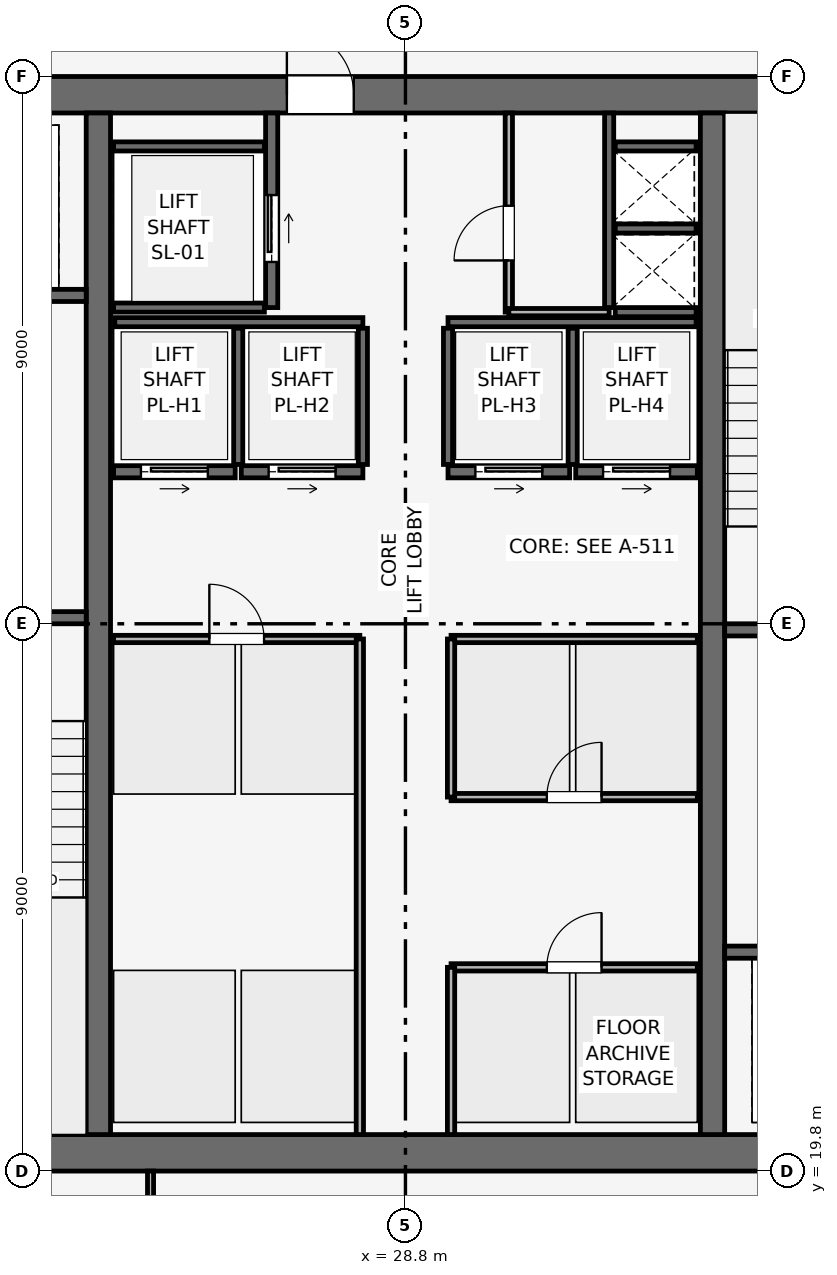
"""IFC4 building model, lengths in metres.
Left out: names, types, materials, properties, quantities, classifications, styles, units other than length and angle.
Written with IfcOpenShell. Run it as: python <this file> out.ifc"""

import sys

from ifc_helpers import new_model, si_unit, direction, frame, frame_2d, origin, place, context, subcontext, project, spatial, rectangle, extrude, element, fill, save


model = new_model("IFC4")
c1 = context("Model", 3, precision=1e-05, world=origin(), true_north=direction((0.0, 1.0)))
c2 = subcontext(c1, "Body", "Model", "MODEL_VIEW")
j1 = project(units=[si_unit("LENGTHUNIT", "METRE"), si_unit("PLANEANGLEUNIT", "RADIAN")], contexts=[c1])
p1 = place(None, origin())
s1 = spatial("IfcSite", under=j1, at=p1, CompositionType="ELEMENT")
p2 = place(p1, origin())
s2 = spatial("IfcBuilding", under=s1, at=p2, CompositionType="ELEMENT")
p3 = place(p2, frame((0.0, 0.0, 314.25)))
s3 = spatial("IfcBuildingStorey", under=s2, at=p3, CompositionType="ELEMENT", Elevation=314.25)
p4 = place(p3, frame((19.8, 20.1, 0.0), z_axis=(0.0, 0.0, 1.0), x_axis=(1.0, 0.0, 0.0)))
e1 = element("IfcWall", 1, at=p4, inside=s3, PredefinedType="SHEAR", context=c2, shape_type="SweptSolid", body=[
    extrude(rectangle(XDim=18.0, YDim=0.6, at=frame_2d((9.0, 0.0))), origin(), (0.0, 0.0, 1.0), 3.75),
])
p5 = place(p3, frame((19.8, 37.5, 0.0), z_axis=(0.0, 0.0, 1.0), x_axis=(1.0, 0.0, 0.0)))
e2 = element("IfcWall", 2, at=p5, inside=s3, PredefinedType="SHEAR", context=c2, shape_type="SweptSolid", body=[
    extrude(rectangle(XDim=18.0, YDim=0.6, at=frame_2d((9.0, 0.0))), origin(), (0.0, 0.0, 1.0), 3.75),
])
p6 = place(p5, frame((7.05, 0.0, 0.0)))
e3 = element("IfcOpeningElement", 3, at=p6, cuts=e2, PredefinedType="OPENING", context=c2, shape_type="SweptSolid", body=[
    extrude(rectangle(XDim=1.1, YDim=2.15, at=frame_2d((0.55, 1.075))), frame((0.0, 0.31, 0.0), z_axis=(0.0, -1.0, 0.0), x_axis=(1.0, 0.0, 0.0)), (0.0, 0.0, 1.0), 0.62),
])
for number, where, z_axis, x_axis in (
    (4, (23.75, 20.4, 0.0), (0.0, 0.0, 1.0), (0.0, 1.0, 0.0)),
    (5, (33.85, 20.4, 0.0), (0.0, 0.0, 1.0), (0.0, 1.0, 0.0)),
):
    element("IfcWall", number, at=place(p3, frame(where, z_axis=z_axis, x_axis=x_axis)), inside=s3, PredefinedType="SHEAR", context=c2, shape_type="SweptSolid", body=[
        extrude(rectangle(XDim=16.8, YDim=0.4, at=frame_2d((8.4, 0.0))), origin(), (0.0, 0.0, 1.0), 3.75),
    ])
p7 = place(p3, frame((20.4, 28.9, 0.0), z_axis=(0.0, 0.0, 1.0), x_axis=(1.0, 0.0, 0.0)))
e6 = element("IfcWall", 6, at=p7, inside=s3, PredefinedType="SHEAR", context=c2, shape_type="SweptSolid", body=[
    extrude(rectangle(XDim=3.15, YDim=0.2, at=frame_2d((1.575, 0.0))), origin(), (0.0, 0.0, 1.0), 3.51),
])
p8 = place(p7, frame((0.8, 0.0, 0.0)))
e7 = element("IfcOpeningElement", 7, at=p8, cuts=e6, PredefinedType="OPENING", context=c2, shape_type="SweptSolid", body=[
    extrude(rectangle(XDim=1.0, YDim=2.1, at=frame_2d((0.5, 1.05))), frame((0.0, 0.11, 0.0), z_axis=(0.0, -1.0, 0.0), x_axis=(1.0, 0.0, 0.0)), (0.0, 0.0, 1.0), 0.22),
])
p9 = place(p3, frame((34.05, 28.7, 0.0), z_axis=(0.0, 0.0, 1.0), x_axis=(1.0, 0.0, 0.0)))
e8 = element("IfcWall", 8, at=p9, inside=s3, PredefinedType="SHEAR", context=c2, shape_type="SweptSolid", body=[
    extrude(rectangle(XDim=3.15, YDim=0.2, at=frame_2d((1.575, 0.0))), origin(), (0.0, 0.0, 1.0), 3.51),
])
p10 = place(p9, frame((0.8, 0.0, 0.0)))
e9 = element("IfcOpeningElement", 9, at=p10, cuts=e8, PredefinedType="OPENING", context=c2, shape_type="SweptSolid", body=[
    extrude(rectangle(XDim=1.0, YDim=2.1, at=frame_2d((0.5, 1.05))), frame((0.0, 0.11, 0.0), z_axis=(0.0, -1.0, 0.0), x_axis=(1.0, 0.0, 0.0)), (0.0, 0.0, 1.0), 0.22),
])
p11 = place(p3, frame((32.15, 34.0, 0.0), z_axis=(0.0, 0.0, 1.0), x_axis=(0.0, 1.0, 0.0)))
e10 = element("IfcWall", 10, at=p11, inside=s3, PredefinedType="SHEAR", context=c2, shape_type="SweptSolid", body=[
    extrude(rectangle(XDim=3.2, YDim=0.15, at=frame_2d((1.6, 0.0))), origin(), (0.0, 0.0, 1.0), 3.51),
])
for number, where, z_axis, x_axis in (
    (11, (32.25, 33.925, 0.0), (0.0, 0.0, 1.0), (1.0, 0.0, 0.0)),
    (12, (32.25, 35.3, 0.0), (0.0, 0.0, 1.0), (1.0, 0.0, 0.0)),
):
    element("IfcWall", number, at=place(p3, frame(where, z_axis=z_axis, x_axis=x_axis)), inside=s3, PredefinedType="SHEAR", context=c2, shape_type="SweptSolid", body=[
        extrude(rectangle(XDim=1.33, YDim=0.15, at=frame_2d((0.665, 0.0))), origin(), (0.0, 0.0, 1.0), 3.51),
    ])
p12 = place(p3, frame((20.5, 34.2, 0.0), z_axis=(0.0, 0.0, 1.0), x_axis=(1.0, 0.0, 0.0)))
e13 = element("IfcWall", 13, at=p12, inside=s3, PredefinedType="SHEAR", context=c2, shape_type="SweptSolid", body=[
    extrude(rectangle(XDim=3.05, YDim=0.2, at=frame_2d((1.525, 0.0))), origin(), (0.0, 0.0, 1.0), 3.51),
])
p13 = place(p12, frame((0.75, 0.0, 0.0)))
e14 = element("IfcOpeningElement", 14, at=p13, cuts=e13, PredefinedType="OPENING", context=c2, shape_type="SweptSolid", body=[
    extrude(rectangle(XDim=1.1, YDim=2.15, at=frame_2d((0.55, 1.075))), frame((0.0, 0.11, 0.0), z_axis=(0.0, -1.0, 0.0), x_axis=(1.0, 0.0, 0.0)), (0.0, 0.0, 1.0), 0.22),
])
p14 = place(p3, frame((34.05, 23.4, 0.0), z_axis=(0.0, 0.0, 1.0), x_axis=(1.0, 0.0, 0.0)))
e15 = element("IfcWall", 15, at=p14, inside=s3, PredefinedType="SHEAR", context=c2, shape_type="SweptSolid", body=[
    extrude(rectangle(XDim=3.05, YDim=0.2, at=frame_2d((1.525, 0.0))), origin(), (0.0, 0.0, 1.0), 3.51),
])
p15 = place(p14, frame((1.2, 0.0, 0.0)))
e16 = element("IfcOpeningElement", 16, at=p15, cuts=e15, PredefinedType="OPENING", context=c2, shape_type="SweptSolid", body=[
    extrude(rectangle(XDim=1.1, YDim=2.15, at=frame_2d((0.55, 1.075))), frame((0.0, 0.11, 0.0), z_axis=(0.0, -1.0, 0.0), x_axis=(1.0, 0.0, 0.0)), (0.0, 0.0, 1.0), 0.22),
])
p16 = place(p3, frame((26.6, 34.0, 0.0), z_axis=(0.0, 0.0, 1.0), x_axis=(0.0, 1.0, 0.0)))
e17 = element("IfcWall", 17, at=p16, inside=s3, PredefinedType="SHEAR", context=c2, shape_type="SweptSolid", body=[
    extrude(rectangle(XDim=3.2, YDim=0.2, at=frame_2d((1.6, 0.0))), origin(), (0.0, 0.0, 1.0), 3.51),
])
p17 = place(p16, frame((0.75, 0.0, 0.0)))
e18 = element("IfcOpeningElement", 18, at=p17, cuts=e17, PredefinedType="OPENING", context=c2, shape_type="SweptSolid", body=[
    extrude(rectangle(XDim=1.1, YDim=2.15, at=frame_2d((0.55, 1.075))), frame((0.0, 0.11, 0.0), z_axis=(0.0, -1.0, 0.0), x_axis=(1.0, 0.0, 0.0)), (0.0, 0.0, 1.0), 0.22),
])
for number, where, z_axis, x_axis in (
    (19, (24.0, 34.0, 0.0), (0.0, 0.0, 1.0), (1.0, 0.0, 0.0)),
    (20, (24.0, 36.65, 0.0), (0.0, 0.0, 1.0), (1.0, 0.0, 0.0)),
):
    element("IfcWall", number, at=place(p3, frame(where, z_axis=z_axis, x_axis=x_axis)), inside=s3, PredefinedType="SHEAR", context=c2, shape_type="SweptSolid", body=[
        extrude(rectangle(XDim=2.48, YDim=0.15, at=frame_2d((1.24, 0.0))), origin(), (0.0, 0.0, 1.0), 3.51),
    ])
p18 = place(p3, frame((24.0, 31.3, 0.0), z_axis=(0.0, 0.0, 1.0), x_axis=(1.0, 0.0, 0.0)))
e21 = element("IfcWall", 21, at=p18, inside=s3, PredefinedType="SHEAR", context=c2, shape_type="SweptSolid", body=[
    extrude(rectangle(XDim=2.0, YDim=0.2, at=frame_2d((1.0, 0.0))), origin(), (0.0, 0.0, 1.0), 3.51),
])
p19 = place(p18, frame((0.45, 0.0, 0.0)))
e22 = element("IfcOpeningElement", 22, at=p19, cuts=e21, PredefinedType="OPENING", context=c2, shape_type="SweptSolid", body=[
    extrude(rectangle(XDim=1.1, YDim=2.15, at=frame_2d((0.55, 1.075))), frame((0.0, 0.11, 0.0), z_axis=(0.0, -1.0, 0.0), x_axis=(1.0, 0.0, 0.0)), (0.0, 0.0, 1.0), 0.22),
])
p20 = place(p3, frame((26.1, 31.3, 0.0), z_axis=(0.0, 0.0, 1.0), x_axis=(1.0, 0.0, 0.0)))
e23 = element("IfcWall", 23, at=p20, inside=s3, PredefinedType="SHEAR", context=c2, shape_type="SweptSolid", body=[
    extrude(rectangle(XDim=2.0, YDim=0.2, at=frame_2d((1.0, 0.0))), origin(), (0.0, 0.0, 1.0), 3.51),
])
p21 = place(p20, frame((0.45, 0.0, 0.0)))
e24 = element("IfcOpeningElement", 24, at=p21, cuts=e23, PredefinedType="OPENING", context=c2, shape_type="SweptSolid", body=[
    extrude(rectangle(XDim=1.1, YDim=2.15, at=frame_2d((0.55, 1.075))), frame((0.0, 0.11, 0.0), z_axis=(0.0, -1.0, 0.0), x_axis=(1.0, 0.0, 0.0)), (0.0, 0.0, 1.0), 0.22),
])
p22 = place(p3, frame((29.5, 31.3, 0.0), z_axis=(0.0, 0.0, 1.0), x_axis=(1.0, 0.0, 0.0)))
e25 = element("IfcWall", 25, at=p22, inside=s3, PredefinedType="SHEAR", context=c2, shape_type="SweptSolid", body=[
    extrude(rectangle(XDim=2.0, YDim=0.2, at=frame_2d((1.0, 0.0))), origin(), (0.0, 0.0, 1.0), 3.51),
])
p23 = place(p22, frame((0.45, 0.0, 0.0)))
e26 = element("IfcOpeningElement", 26, at=p23, cuts=e25, PredefinedType="OPENING", context=c2, shape_type="SweptSolid", body=[
    extrude(rectangle(XDim=1.1, YDim=2.15, at=frame_2d((0.55, 1.075))), frame((0.0, 0.11, 0.0), z_axis=(0.0, -1.0, 0.0), x_axis=(1.0, 0.0, 0.0)), (0.0, 0.0, 1.0), 0.22),
])
p24 = place(p3, frame((31.6, 31.3, 0.0), z_axis=(0.0, 0.0, 1.0), x_axis=(1.0, 0.0, 0.0)))
e27 = element("IfcWall", 27, at=p24, inside=s3, PredefinedType="SHEAR", context=c2, shape_type="SweptSolid", body=[
    extrude(rectangle(XDim=2.0, YDim=0.2, at=frame_2d((1.0, 0.0))), origin(), (0.0, 0.0, 1.0), 3.51),
])
p25 = place(p24, frame((0.45, 0.0, 0.0)))
e28 = element("IfcOpeningElement", 28, at=p25, cuts=e27, PredefinedType="OPENING", context=c2, shape_type="SweptSolid", body=[
    extrude(rectangle(XDim=1.1, YDim=2.15, at=frame_2d((0.55, 1.075))), frame((0.0, 0.11, 0.0), z_axis=(0.0, -1.0, 0.0), x_axis=(1.0, 0.0, 0.0)), (0.0, 0.0, 1.0), 0.22),
])
p26 = place(p3, frame((32.25, 36.65, 0.0), z_axis=(0.0, 0.0, 1.0), x_axis=(1.0, 0.0, 0.0)))
e29 = element("IfcWall", 29, at=p26, inside=s3, PredefinedType="SHEAR", context=c2, shape_type="SweptSolid", body=[
    extrude(rectangle(XDim=1.33, YDim=0.15, at=frame_2d((0.665, 0.0))), origin(), (0.0, 0.0, 1.0), 3.51),
])
for number, where, z_axis, x_axis in (
    (30, (24.02, 33.76, 0.0), (0.0, 0.0, 1.0), (1.0, 0.0, 0.0)),
    (31, (29.5, 33.76, 0.0), (0.0, 0.0, 1.0), (1.0, 0.0, 0.0)),
):
    element("IfcWall", number, at=place(p3, frame(where, z_axis=z_axis, x_axis=x_axis)), inside=s3, PredefinedType="SHEAR", context=c2, shape_type="SweptSolid", body=[
        extrude(rectangle(XDim=4.08, YDim=0.15, at=frame_2d((2.04, 0.0))), origin(), (0.0, 0.0, 1.0), 3.51),
    ])
for number, where, z_axis, x_axis in (
    (32, (26.05, 31.42, 0.0), (0.0, 0.0, 1.0), (0.0, 1.0, 0.0)),
    (33, (28.1, 31.42, 0.0), (0.0, 0.0, 1.0), (0.0, 1.0, 0.0)),
    (34, (29.5, 31.42, 0.0), (0.0, 0.0, 1.0), (0.0, 1.0, 0.0)),
    (35, (31.55, 31.42, 0.0), (0.0, 0.0, 1.0), (0.0, 1.0, 0.0)),
):
    element("IfcWall", number, at=place(p3, frame(where, z_axis=z_axis, x_axis=x_axis)), inside=s3, PredefinedType="SHEAR", context=c2, shape_type="SweptSolid", body=[
        extrude(rectangle(XDim=2.24, YDim=0.15, at=frame_2d((1.12, 0.0))), origin(), (0.0, 0.0, 1.0), 3.51),
    ])
p27 = place(p3, frame((30.5, 33.925, 0.0), z_axis=(0.0, 0.0, 1.0), x_axis=(0.0, 1.0, 0.0)))
e36 = element("IfcWall", 36, at=p27, inside=s3, PredefinedType="PARTITIONING", context=c2, shape_type="SweptSolid", body=[
    extrude(rectangle(XDim=3.275, YDim=0.12, at=frame_2d((1.637, 0.0))), origin(), (0.0, 0.0, 1.0), 3.51),
])
p28 = place(p27, frame((0.85, 0.0, 0.0)))
e37 = element("IfcOpeningElement", 37, at=p28, cuts=e36, PredefinedType="OPENING", context=c2, shape_type="SweptSolid", body=[
    extrude(rectangle(XDim=0.9, YDim=2.1, at=frame_2d((0.45, 1.05))), frame((0.0, 0.07, 0.0), z_axis=(0.0, -1.0, 0.0), x_axis=(1.0, 0.0, 0.0)), (0.0, 0.0, 1.0), 0.14),
])
p29 = place(p3, frame((30.5, 33.925, 0.0), z_axis=(0.0, 0.0, 1.0), x_axis=(1.0, 0.0, 0.0)))
e38 = element("IfcWall", 38, at=p29, inside=s3, PredefinedType="PARTITIONING", context=c2, shape_type="SweptSolid", body=[
    extrude(rectangle(XDim=1.65, YDim=0.12, at=frame_2d((0.825, 0.0))), origin(), (0.0, 0.0, 1.0), 3.51),
])
p30 = place(p3, frame((24.0, 28.55, 0.0), z_axis=(0.0, 0.0, 1.0), x_axis=(1.0, 0.0, 0.0)))
e39 = element("IfcWall", 39, at=p30, inside=s3, PredefinedType="PARTITIONING", context=c2, shape_type="SweptSolid", body=[
    extrude(rectangle(XDim=4.05, YDim=0.12, at=frame_2d((2.025, 0.0))), origin(), (0.0, 0.0, 1.0), 3.51),
])
p31 = place(p30, frame((1.575, 0.0, 0.0)))
e40 = element("IfcOpeningElement", 40, at=p31, cuts=e39, PredefinedType="OPENING", context=c2, shape_type="SweptSolid", body=[
    extrude(rectangle(XDim=0.9, YDim=2.1, at=frame_2d((0.45, 1.05))), frame((0.0, 0.07, 0.0), z_axis=(0.0, -1.0, 0.0), x_axis=(1.0, 0.0, 0.0)), (0.0, 0.0, 1.0), 0.14),
])
p32 = place(p3, frame((28.05, 20.4, 0.0), z_axis=(0.0, 0.0, 1.0), x_axis=(0.0, 1.0, 0.0)))
e41 = element("IfcWall", 41, at=p32, inside=s3, PredefinedType="PARTITIONING", context=c2, shape_type="SweptSolid", body=[
    extrude(rectangle(XDim=8.15, YDim=0.12, at=frame_2d((4.075, 0.0))), origin(), (0.0, 0.0, 1.0), 3.51),
])
p33 = place(p3, frame((29.55, 23.15, 0.0), z_axis=(0.0, 0.0, 1.0), x_axis=(1.0, 0.0, 0.0)))
e42 = element("IfcWall", 42, at=p33, inside=s3, PredefinedType="PARTITIONING", context=c2, shape_type="SweptSolid", body=[
    extrude(rectangle(XDim=4.05, YDim=0.12, at=frame_2d((2.025, 0.0))), origin(), (0.0, 0.0, 1.0), 3.51),
])
p34 = place(p33, frame((1.575, 0.0, 0.0)))
e43 = element("IfcOpeningElement", 43, at=p34, cuts=e42, PredefinedType="OPENING", context=c2, shape_type="SweptSolid", body=[
    extrude(rectangle(XDim=0.9, YDim=2.1, at=frame_2d((0.45, 1.05))), frame((0.0, 0.07, 0.0), z_axis=(0.0, -1.0, 0.0), x_axis=(1.0, 0.0, 0.0)), (0.0, 0.0, 1.0), 0.14),
])
p35 = place(p3, frame((29.55, 20.4, 0.0), z_axis=(0.0, 0.0, 1.0), x_axis=(0.0, 1.0, 0.0)))
e44 = element("IfcWall", 44, at=p35, inside=s3, PredefinedType="PARTITIONING", context=c2, shape_type="SweptSolid", body=[
    extrude(rectangle(XDim=2.75, YDim=0.12, at=frame_2d((1.375, 0.0))), origin(), (0.0, 0.0, 1.0), 3.51),
])
p36 = place(p3, frame((29.55, 25.95, 0.0), z_axis=(0.0, 0.0, 1.0), x_axis=(1.0, 0.0, 0.0)))
e45 = element("IfcWall", 45, at=p36, inside=s3, PredefinedType="PARTITIONING", context=c2, shape_type="SweptSolid", body=[
    extrude(rectangle(XDim=4.05, YDim=0.12, at=frame_2d((2.025, 0.0))), origin(), (0.0, 0.0, 1.0), 3.51),
])
p37 = place(p36, frame((1.575, 0.0, 0.0)))
e46 = element("IfcOpeningElement", 46, at=p37, cuts=e45, PredefinedType="OPENING", context=c2, shape_type="SweptSolid", body=[
    extrude(rectangle(XDim=0.9, YDim=2.1, at=frame_2d((0.45, 1.05))), frame((0.0, 0.07, 0.0), z_axis=(0.0, -1.0, 0.0), x_axis=(1.0, 0.0, 0.0)), (0.0, 0.0, 1.0), 0.14),
])
p38 = place(p3, frame((29.55, 28.55, 0.0), z_axis=(0.0, 0.0, 1.0), x_axis=(1.0, 0.0, 0.0)))
e47 = element("IfcWall", 47, at=p38, inside=s3, PredefinedType="PARTITIONING", context=c2, shape_type="SweptSolid", body=[
    extrude(rectangle(XDim=4.05, YDim=0.12, at=frame_2d((2.025, 0.0))), origin(), (0.0, 0.0, 1.0), 3.51),
])
p39 = place(p3, frame((29.55, 25.95, 0.0), z_axis=(0.0, 0.0, 1.0), x_axis=(0.0, 1.0, 0.0)))
e48 = element("IfcWall", 48, at=p39, inside=s3, PredefinedType="PARTITIONING", context=c2, shape_type="SweptSolid", body=[
    extrude(rectangle(XDim=2.6, YDim=0.12, at=frame_2d((1.3, 0.0))), origin(), (0.0, 0.0, 1.0), 3.51),
])
p40 = place(p3, frame((24.608, 6.13, 0.0), z_axis=(0.0, 0.0, 1.0), x_axis=(0.0, 1.0, 0.0)))
e49 = element("IfcWall", 49, at=p40, inside=s3, PredefinedType="MOVABLE", context=c2, shape_type="SweptSolid", body=[
    extrude(rectangle(XDim=13.67, YDim=0.1, at=frame_2d((6.835, 0.0))), origin(), (0.0, 0.0, 1.0), 3.135),
])
p41 = place(p40, frame((11.27, 0.0, 0.0)))
e50 = element("IfcOpeningElement", 50, at=p41, cuts=e49, PredefinedType="OPENING", context=c2, shape_type="SweptSolid", body=[
    extrude(rectangle(XDim=0.9, YDim=2.1, at=frame_2d((0.45, 1.05))), frame((0.0, 0.06, 0.0), z_axis=(0.0, -1.0, 0.0), x_axis=(1.0, 0.0, 0.0)), (0.0, 0.0, 1.0), 0.12),
])
p42 = place(p17, origin())
e51 = element("IfcDoor", 51, at=p42, inside=s3, OperationType="SLIDING_TO_RIGHT", PredefinedType="DOOR", context=c2, shape_type="SweptSolid", body=[
    extrude(rectangle(XDim=1.1, YDim=2.15, at=frame_2d((0.55, 1.075))), frame((0.0, 0.025, 0.0), z_axis=(0.0, -1.0, 0.0), x_axis=(1.0, 0.0, 0.0)), (0.0, 0.0, 1.0), 0.05),
])
fill(e18, e51)
p43 = place(p19, origin())
e52 = element("IfcDoor", 52, at=p43, inside=s3, OperationType="SLIDING_TO_RIGHT", PredefinedType="DOOR", context=c2, shape_type="SweptSolid", body=[
    extrude(rectangle(XDim=1.1, YDim=2.15, at=frame_2d((0.55, 1.075))), frame((0.0, 0.025, 0.0), z_axis=(0.0, -1.0, 0.0), x_axis=(1.0, 0.0, 0.0)), (0.0, 0.0, 1.0), 0.05),
])
fill(e22, e52)
p44 = place(p21, origin())
e53 = element("IfcDoor", 53, at=p44, inside=s3, OperationType="SLIDING_TO_RIGHT", PredefinedType="DOOR", context=c2, shape_type="SweptSolid", body=[
    extrude(rectangle(XDim=1.1, YDim=2.15, at=frame_2d((0.55, 1.075))), frame((0.0, 0.025, 0.0), z_axis=(0.0, -1.0, 0.0), x_axis=(1.0, 0.0, 0.0)), (0.0, 0.0, 1.0), 0.05),
])
fill(e24, e53)
p45 = place(p23, origin())
e54 = element("IfcDoor", 54, at=p45, inside=s3, OperationType="SLIDING_TO_RIGHT", PredefinedType="DOOR", context=c2, shape_type="SweptSolid", body=[
    extrude(rectangle(XDim=1.1, YDim=2.15, at=frame_2d((0.55, 1.075))), frame((0.0, 0.025, 0.0), z_axis=(0.0, -1.0, 0.0), x_axis=(1.0, 0.0, 0.0)), (0.0, 0.0, 1.0), 0.05),
])
fill(e26, e54)
p46 = place(p25, origin())
e55 = element("IfcDoor", 55, at=p46, inside=s3, OperationType="SLIDING_TO_RIGHT", PredefinedType="DOOR", context=c2, shape_type="SweptSolid", body=[
    extrude(rectangle(XDim=1.1, YDim=2.15, at=frame_2d((0.55, 1.075))), frame((0.0, 0.025, 0.0), z_axis=(0.0, -1.0, 0.0), x_axis=(1.0, 0.0, 0.0)), (0.0, 0.0, 1.0), 0.05),
])
fill(e28, e55)
p47 = place(p28, origin())
e56 = element("IfcDoor", 56, at=p47, inside=s3, OperationType="SINGLE_SWING_LEFT", PredefinedType="DOOR", context=c2, shape_type="SweptSolid", body=[
    extrude(rectangle(XDim=0.9, YDim=2.1, at=frame_2d((0.45, 1.05))), frame((0.0, 0.025, 0.0), z_axis=(0.0, -1.0, 0.0), x_axis=(1.0, 0.0, 0.0)), (0.0, 0.0, 1.0), 0.05),
])
fill(e37, e56)
p48 = place(p31, origin())
e57 = element("IfcDoor", 57, at=p48, inside=s3, OperationType="SINGLE_SWING_LEFT", PredefinedType="DOOR", context=c2, shape_type="SweptSolid", body=[
    extrude(rectangle(XDim=0.9, YDim=2.1, at=frame_2d((0.45, 1.05))), frame((0.0, 0.025, 0.0), z_axis=(0.0, -1.0, 0.0), x_axis=(1.0, 0.0, 0.0)), (0.0, 0.0, 1.0), 0.05),
])
fill(e40, e57)
p49 = place(p34, origin())
e58 = element("IfcDoor", 58, at=p49, inside=s3, OperationType="SINGLE_SWING_RIGHT", PredefinedType="DOOR", context=c2, shape_type="SweptSolid", body=[
    extrude(rectangle(XDim=0.9, YDim=2.1, at=frame_2d((0.45, 1.05))), frame((0.0, 0.025, 0.0), z_axis=(0.0, -1.0, 0.0), x_axis=(1.0, 0.0, 0.0)), (0.0, 0.0, 1.0), 0.05),
])
fill(e43, e58)
p50 = place(p37, origin())
e59 = element("IfcDoor", 59, at=p50, inside=s3, OperationType="SINGLE_SWING_RIGHT", PredefinedType="DOOR", context=c2, shape_type="SweptSolid", body=[
    extrude(rectangle(XDim=0.9, YDim=2.1, at=frame_2d((0.45, 1.05))), frame((0.0, 0.025, 0.0), z_axis=(0.0, -1.0, 0.0), x_axis=(1.0, 0.0, 0.0)), (0.0, 0.0, 1.0), 0.05),
])
fill(e46, e59)
p51 = place(p6, origin())
e60 = element("IfcDoor", 60, at=p51, inside=s3, OperationType="SINGLE_SWING_LEFT", PredefinedType="DOOR", context=c2, shape_type="SweptSolid", body=[
    extrude(rectangle(XDim=1.1, YDim=2.15, at=frame_2d((0.55, 1.075))), frame((0.0, 0.025, 0.0), z_axis=(0.0, -1.0, 0.0), x_axis=(1.0, 0.0, 0.0)), (0.0, 0.0, 1.0), 0.05),
])
fill(e3, e60)
save(model, sys.argv[1])
